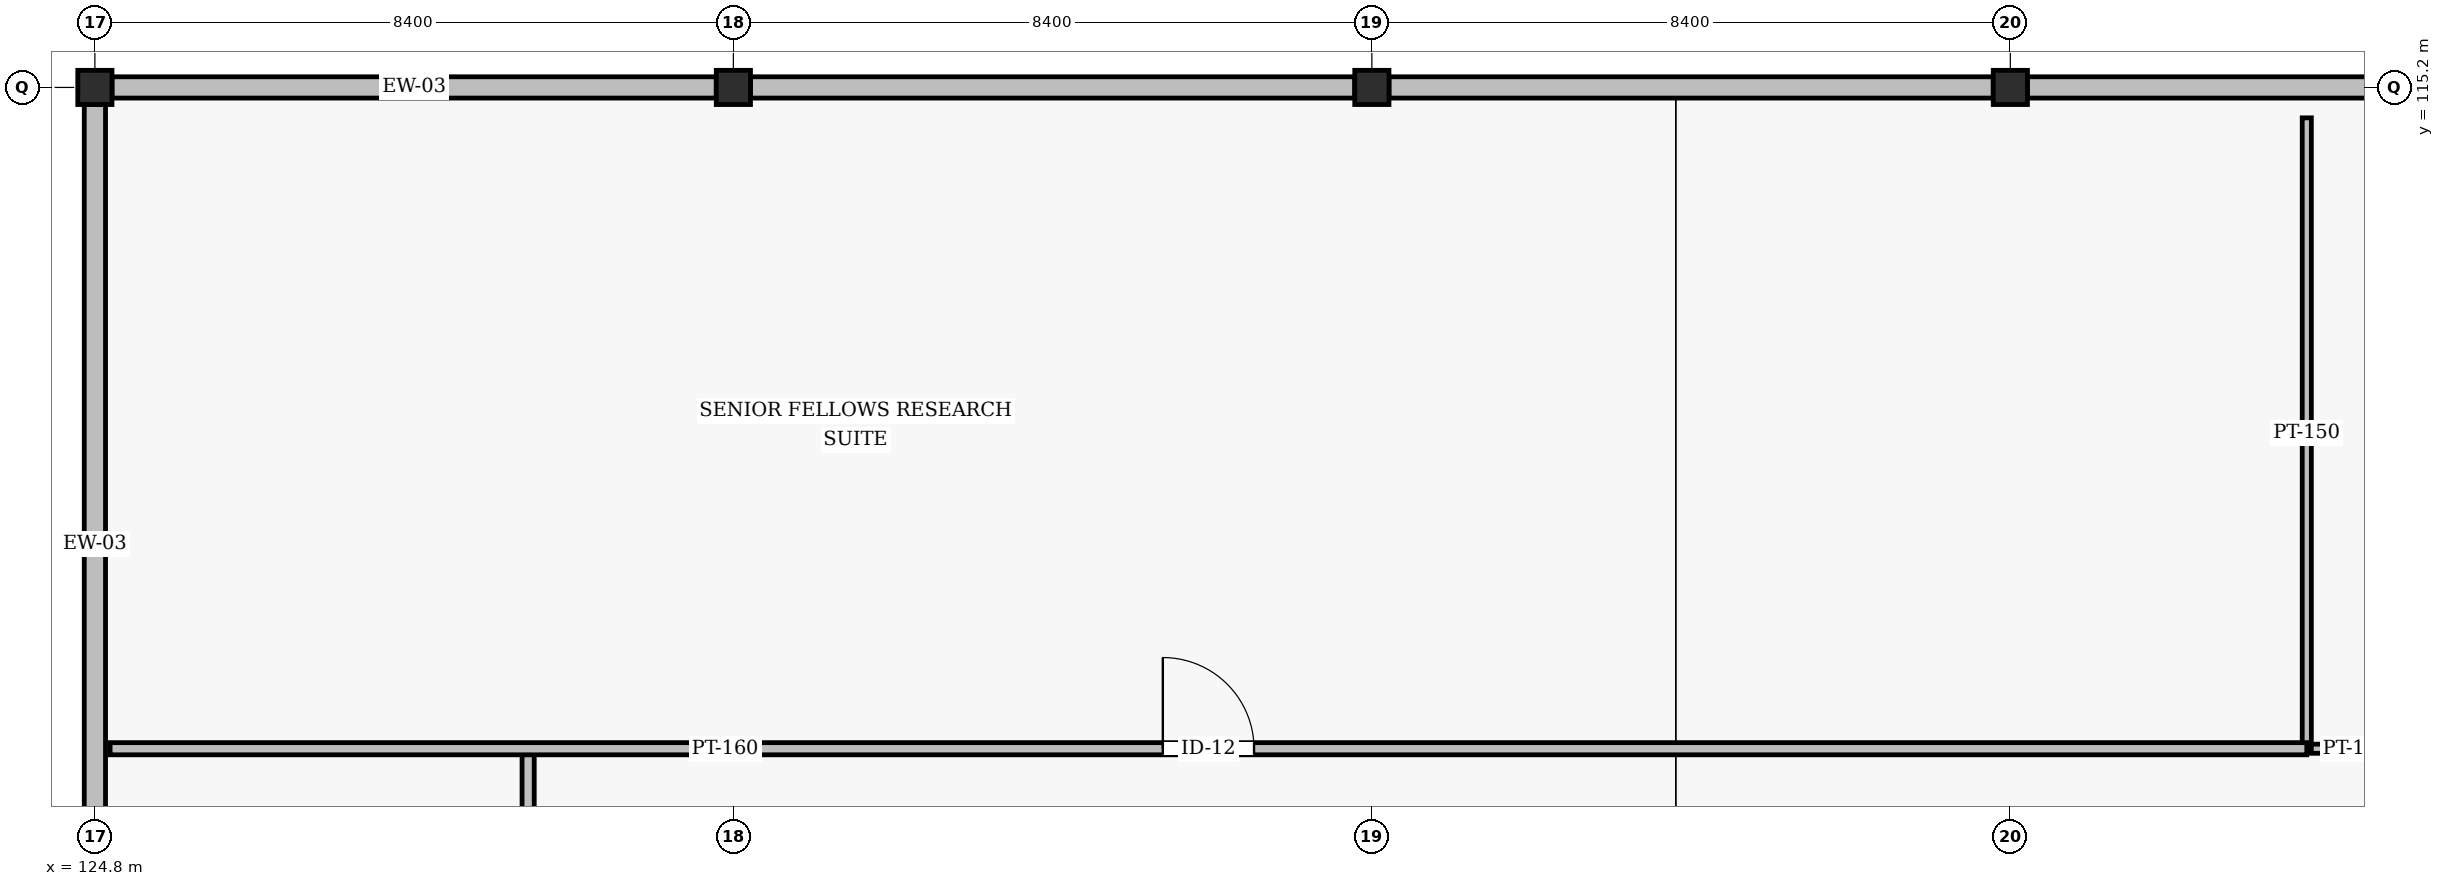
"""IFC4 building model, lengths in metres.
Left out: names, types, materials, properties, quantities, classifications, styles, units other than length and angle.
Written with IfcOpenShell. Run it as: python <this file> out.ifc"""

import sys

from ifc_helpers import new_model, si_unit, direction, frame, frame_2d, origin, origin_2d, place, context, subcontext, project, spatial, rectangle, hollow_rectangle, extrude, element, fill, save


model = new_model("IFC4")
c1 = context("Model", 3, precision=1e-05, world=origin(), true_north=direction((0.0, 1.0)))
c2 = subcontext(c1, "Body", "Model", "MODEL_VIEW")
j1 = project(units=[si_unit("LENGTHUNIT", "METRE"), si_unit("PLANEANGLEUNIT", "RADIAN")], contexts=[c1])
p1 = place(None, origin())
s1 = spatial("IfcSite", under=j1, at=p1, CompositionType="ELEMENT")
p2 = place(p1, origin())
s2 = spatial("IfcBuilding", under=s1, at=p2, CompositionType="ELEMENT")
p3 = place(p2, frame((0.0, 0.0, 46.8)))
s3 = spatial("IfcBuildingStorey", under=s2, at=p3, CompositionType="ELEMENT", Elevation=46.8)
p4 = place(p3, frame((124.8, 115.2, 0.0), z_axis=(0.0, 0.0, 1.0), x_axis=(1.0, 0.0, 0.0)))
e1 = element("IfcColumn", 1, at=p4, inside=s3, PredefinedType="COLUMN", context=c2, shape_type="SweptSolid", body=[
    extrude(hollow_rectangle(XDim=0.45, YDim=0.45, WallThickness=0.018, InnerFilletRadius=0.018, OuterFilletRadius=0.036, at=origin_2d()), origin(), (0.0, 0.0, 1.0), 3.576),
])
for number, where, z_axis, x_axis in (
    (2, (133.2, 115.2, 0.0), (0.0, 0.0, 1.0), (1.0, 0.0, 0.0)),
    (3, (141.6, 115.2, 0.0), (0.0, 0.0, 1.0), (1.0, 0.0, 0.0)),
    (4, (150.0, 115.2, 0.0), (0.0, 0.0, 1.0), (1.0, 0.0, 0.0)),
):
    element("IfcColumn", number, at=place(p3, frame(where, z_axis=z_axis, x_axis=x_axis)), inside=s3, PredefinedType="COLUMN", context=c2, shape_type="SweptSolid", body=[
        extrude(hollow_rectangle(XDim=0.45, YDim=0.45, WallThickness=0.018, InnerFilletRadius=0.018, OuterFilletRadius=0.036, at=origin_2d()), origin(), (0.0, 0.0, 1.0), 3.6),
    ])
p5 = place(p3, frame((158.775, 115.2, 0.0), z_axis=(0.0, 0.0, 1.0), x_axis=(-1.0, 0.0, 0.0)))
e5 = element("IfcWall", 5, at=p5, inside=s3, PredefinedType="SOLIDWALL", context=c2, shape_type="SweptSolid", body=[
    extrude(rectangle(XDim=8.55, YDim=0.28, at=frame_2d((4.275, 0.0))), origin(), (0.0, 0.0, 1.0), 2.546),
])
for number, where, z_axis, x_axis in (
    (6, (149.775, 115.2, 0.0), (0.0, 0.0, 1.0), (-1.0, 0.0, 0.0)),
    (7, (141.375, 115.2, 0.0), (0.0, 0.0, 1.0), (-1.0, 0.0, 0.0)),
):
    element("IfcWall", number, at=place(p3, frame(where, z_axis=z_axis, x_axis=x_axis)), inside=s3, PredefinedType="SOLIDWALL", context=c2, shape_type="SweptSolid", body=[
        extrude(rectangle(XDim=7.95, YDim=0.28, at=frame_2d((3.975, 0.0))), origin(), (0.0, 0.0, 1.0), 2.838),
    ])
p6 = place(p3, frame((132.975, 115.2, 0.0), z_axis=(0.0, 0.0, 1.0), x_axis=(-1.0, 0.0, 0.0)))
e8 = element("IfcWall", 8, at=p6, inside=s3, PredefinedType="SOLIDWALL", context=c2, shape_type="SweptSolid", body=[
    extrude(rectangle(XDim=7.95, YDim=0.28, at=frame_2d((3.975, 0.0))), origin(), (0.0, 0.0, 1.0), 2.838),
])
p7 = place(p3, frame((124.8, 114.975, 0.0), z_axis=(0.0, 0.0, 1.0), x_axis=(0.0, -1.0, 0.0)))
e9 = element("IfcWall", 9, at=p7, inside=s3, PredefinedType="SOLIDWALL", context=c2, shape_type="SweptSolid", body=[
    extrude(rectangle(XDim=11.55, YDim=0.28, at=frame_2d((5.775, 0.0))), origin(), (0.0, 0.0, 1.0), 2.548),
])
p8 = place(p3, frame((153.9, 106.5, 0.0), z_axis=(0.0, 0.0, 1.0), x_axis=(1.0, 0.0, 0.0)))
e10 = element("IfcWall", 10, at=p8, inside=s3, PredefinedType="PARTITIONING", context=c2, shape_type="SweptSolid", body=[
    extrude(rectangle(XDim=3.6, YDim=0.12, at=frame_2d((1.8, 0.0))), origin(), (0.0, 0.0, 1.0), 3.338),
])
p9 = place(p8, frame((1.35, 0.0, 0.0)))
e11 = element("IfcOpeningElement", 11, at=p9, cuts=e10, PredefinedType="OPENING", context=c2, shape_type="SweptSolid", body=[
    extrude(rectangle(XDim=0.9, YDim=2.1, at=frame_2d((0.45, 1.05))), frame((0.0, 0.07, 0.0), z_axis=(0.0, -1.0, 0.0), x_axis=(1.0, 0.0, 0.0)), (0.0, 0.0, 1.0), 0.14),
])
p10 = place(p3, frame((153.9, 106.5, 0.0), z_axis=(0.0, 0.0, 1.0), x_axis=(0.0, 1.0, 0.0)))
e12 = element("IfcWall", 12, at=p10, inside=s3, PredefinedType="PARTITIONING", context=c2, shape_type="SweptSolid", body=[
    extrude(rectangle(XDim=8.3, YDim=0.12, at=frame_2d((4.15, 0.0))), origin(), (0.0, 0.0, 1.0), 2.938),
])
p11 = place(p3, frame((130.5, 92.3, 0.0), z_axis=(0.0, 0.0, 1.0), x_axis=(0.0, 1.0, 0.0)))
e13 = element("IfcWall", 13, at=p11, inside=s3, PredefinedType="PARTITIONING", context=c2, shape_type="SweptSolid", body=[
    extrude(rectangle(XDim=14.2, YDim=0.16, at=frame_2d((7.1, 0.0))), origin(), (0.0, 0.0, 1.0), 2.838),
])
p12 = place(p11, frame((6.5, 0.0, 0.0)))
e14 = element("IfcOpeningElement", 14, at=p12, cuts=e13, PredefinedType="OPENING", context=c2, shape_type="SweptSolid", body=[
    extrude(rectangle(XDim=1.25, YDim=2.12, at=frame_2d((0.625, 1.06))), frame((0.0, 0.09, 0.0), z_axis=(0.0, -1.0, 0.0), x_axis=(1.0, 0.0, 0.0)), (0.0, 0.0, 1.0), 0.18),
])
p13 = place(p3, frame((125.0, 106.5, 0.0), z_axis=(0.0, 0.0, 1.0), x_axis=(1.0, 0.0, 0.0)))
e15 = element("IfcWall", 15, at=p13, inside=s3, PredefinedType="PARTITIONING", context=c2, shape_type="SweptSolid", body=[
    extrude(rectangle(XDim=28.9, YDim=0.16, at=frame_2d((14.45, 0.0))), origin(), (0.0, 0.0, 1.0), 2.588),
])
p14 = place(p13, frame((13.85, 0.0, 0.0)))
e16 = element("IfcOpeningElement", 16, at=p14, cuts=e15, PredefinedType="OPENING", context=c2, shape_type="SweptSolid", body=[
    extrude(rectangle(XDim=1.2, YDim=2.08, at=frame_2d((0.6, 1.04))), frame((0.0, 0.09, 0.0), z_axis=(0.0, -1.0, 0.0), x_axis=(1.0, 0.0, 0.0)), (0.0, 0.0, 1.0), 0.18),
])
p15 = place(p14, origin())
e17 = element("IfcDoor", 17, at=p15, inside=s3, OperationType="SINGLE_SWING_LEFT", PredefinedType="DOOR", context=c2, shape_type="SweptSolid", body=[
    extrude(rectangle(XDim=1.2, YDim=2.08, at=frame_2d((0.6, 1.04))), frame((0.0, 0.025, 0.0), z_axis=(0.0, -1.0, 0.0), x_axis=(1.0, 0.0, 0.0)), (0.0, 0.0, 1.0), 0.05),
])
fill(e16, e17)
save(model, sys.argv[1])
